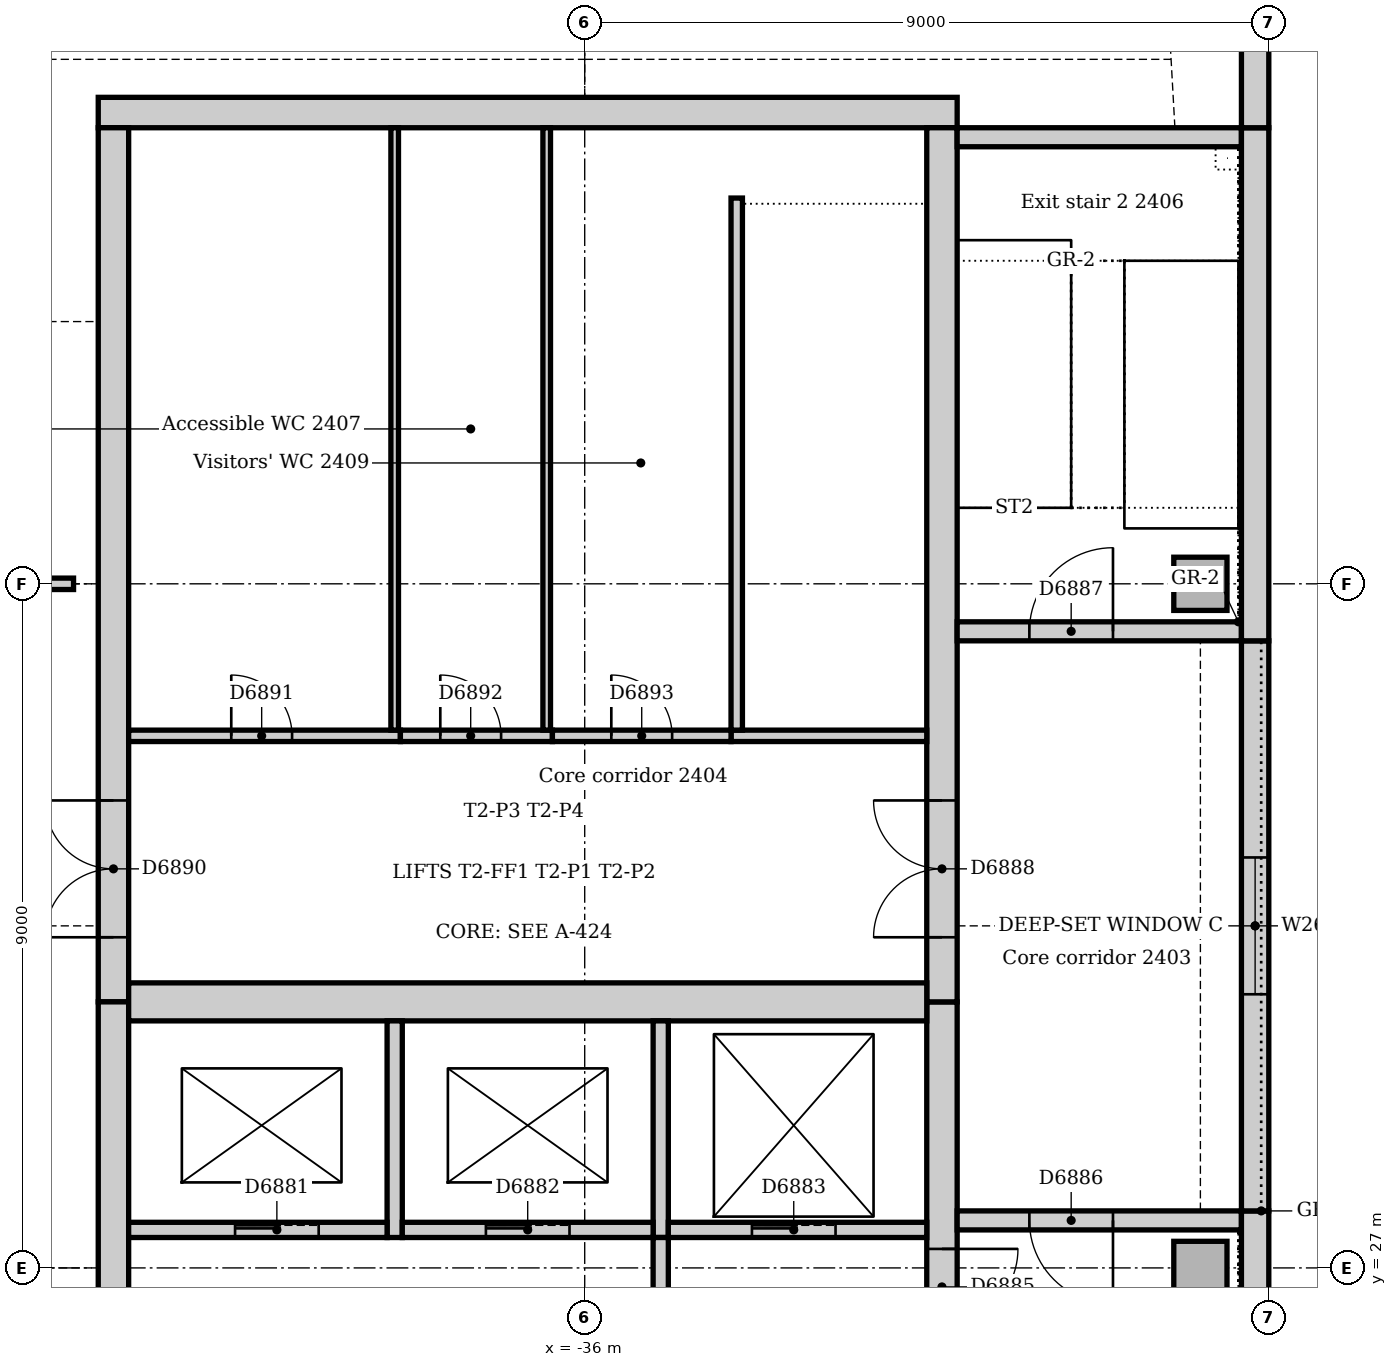
"""IFC4 building model, lengths in metres.
Left out: names, types, materials, properties, quantities, classifications, styles, units other than length and angle.
Written with IfcOpenShell. Run it as: python <this file> out.ifc"""

import sys

from ifc_helpers import new_model, si_unit, direction, frame, frame_2d, origin, origin_2d, place, context, subcontext, project, spatial, rectangle, extrude, element, fill, save


model = new_model("IFC4")
c1 = context("Model", 3, precision=1e-05, world=origin(), true_north=direction((0.0, 1.0)))
c2 = subcontext(c1, "Body", "Model", "MODEL_VIEW")
j1 = project(units=[si_unit("LENGTHUNIT", "METRE"), si_unit("PLANEANGLEUNIT", "RADIAN")], contexts=[c1])
p1 = place(None, origin())
s1 = spatial("IfcSite", under=j1, at=p1, CompositionType="ELEMENT")
p2 = place(p1, origin())
s2 = spatial("IfcBuilding", under=s1, at=p2, CompositionType="ELEMENT")
p3 = place(p2, frame((0.0, 0.0, 104.0)))
s3 = spatial("IfcBuildingStorey", under=s2, at=p3, CompositionType="ELEMENT", Elevation=104.0)
p4 = place(p3, frame((-31.1, 42.2, 0.0), z_axis=(0.0, 0.0, 1.0), x_axis=(-1.0, 0.0, 0.0)))
e1 = element("IfcWall", 1, at=p4, inside=s3, PredefinedType="SOLIDWALL", context=c2, shape_type="SweptSolid", body=[
    extrude(rectangle(XDim=11.3, YDim=0.4, at=frame_2d((5.65, 0.0))), origin(), (0.0, 0.0, 1.0), 4.0),
])
p5 = place(p3, frame((-31.3, 21.0, 0.0), z_axis=(0.0, 0.0, 1.0), x_axis=(0.0, 1.0, 0.0)))
e2 = element("IfcWall", 2, at=p5, inside=s3, PredefinedType="SOLIDWALL", context=c2, shape_type="SweptSolid", body=[
    extrude(rectangle(XDim=9.5, YDim=0.4, at=frame_2d((4.75, 0.0))), origin(), (0.0, 0.0, 1.0), 4.0),
])
p6 = place(p5, frame((5.25, 0.0, 0.0)))
e3 = element("IfcOpeningElement", 3, at=p6, cuts=e2, PredefinedType="OPENING", context=c2, shape_type="SweptSolid", body=[
    extrude(rectangle(XDim=1.0, YDim=2.1, at=frame_2d((0.5, 1.05))), frame((0.0, 0.21, 0.0), z_axis=(0.0, -1.0, 0.0), x_axis=(1.0, 0.0, 0.0)), (0.0, 0.0, 1.0), 0.42),
])
p7 = place(p3, frame((-31.3, 30.5, 0.0), z_axis=(0.0, 0.0, 1.0), x_axis=(0.0, 1.0, 0.0)))
e4 = element("IfcWall", 4, at=p7, inside=s3, PredefinedType="SOLIDWALL", context=c2, shape_type="SweptSolid", body=[
    extrude(rectangle(XDim=11.5, YDim=0.4, at=frame_2d((5.75, 0.0))), origin(), (0.0, 0.0, 1.0), 4.0),
])
p8 = place(p7, frame((0.85, 0.0, 0.0)))
e5 = element("IfcOpeningElement", 5, at=p8, cuts=e4, PredefinedType="OPENING", context=c2, shape_type="SweptSolid", body=[
    extrude(rectangle(XDim=1.8, YDim=2.1, at=frame_2d((0.9, 1.05))), frame((0.0, 0.21, 0.0), z_axis=(0.0, -1.0, 0.0), x_axis=(1.0, 0.0, 0.0)), (0.0, 0.0, 1.0), 0.42),
])
p9 = place(p3, frame((-42.2, 42.0, 0.0), z_axis=(0.0, 0.0, 1.0), x_axis=(0.0, -1.0, 0.0)))
e6 = element("IfcWall", 6, at=p9, inside=s3, PredefinedType="SOLIDWALL", context=c2, shape_type="SweptSolid", body=[
    extrude(rectangle(XDim=11.5, YDim=0.4, at=frame_2d((5.75, 0.0))), origin(), (0.0, 0.0, 1.0), 4.0),
])
p10 = place(p9, frame((8.85, 0.0, 0.0)))
e7 = element("IfcOpeningElement", 7, at=p10, cuts=e6, PredefinedType="OPENING", context=c2, shape_type="SweptSolid", body=[
    extrude(rectangle(XDim=1.8, YDim=2.1, at=frame_2d((0.9, 1.05))), frame((0.0, 0.21, 0.0), z_axis=(0.0, -1.0, 0.0), x_axis=(1.0, 0.0, 0.0)), (0.0, 0.0, 1.0), 0.42),
])
p11 = place(p3, frame((-42.2, 30.5, 0.0), z_axis=(0.0, 0.0, 1.0), x_axis=(0.0, -1.0, 0.0)))
e8 = element("IfcWall", 8, at=p11, inside=s3, PredefinedType="SOLIDWALL", context=c2, shape_type="SweptSolid", body=[
    extrude(rectangle(XDim=9.5, YDim=0.4, at=frame_2d((4.75, 0.0))), origin(), (0.0, 0.0, 1.0), 4.0),
])
p12 = place(p11, frame((3.85, 0.0, 0.0)))
e9 = element("IfcOpeningElement", 9, at=p12, cuts=e8, PredefinedType="OPENING", context=c2, shape_type="SweptSolid", body=[
    extrude(rectangle(XDim=1.8, YDim=2.1, at=frame_2d((0.9, 1.05))), frame((0.0, 0.21, 0.0), z_axis=(0.0, -1.0, 0.0), x_axis=(1.0, 0.0, 0.0)), (0.0, 0.0, 1.0), 0.42),
])
p13 = place(p3, frame((-42.0, 30.5, 0.0), z_axis=(0.0, 0.0, 1.0), x_axis=(1.0, 0.0, 0.0)))
e10 = element("IfcWall", 10, at=p13, inside=s3, PredefinedType="SOLIDWALL", context=c2, shape_type="SweptSolid", body=[
    extrude(rectangle(XDim=10.5, YDim=0.5, at=frame_2d((5.25, 0.0))), origin(), (0.0, 0.0, 1.0), 4.0),
])
p14 = place(p3, frame((-27.36, 27.625, 0.0), z_axis=(0.0, 0.0, 1.0), x_axis=(-1.0, 0.0, 0.0)))
e11 = element("IfcWall", 11, at=p14, inside=s3, PredefinedType="SOLIDWALL", context=c2, shape_type="SweptSolid", body=[
    extrude(rectangle(XDim=3.74, YDim=0.25, at=frame_2d((1.87, 0.0))), origin(), (0.0, 0.0, 1.0), 4.0),
])
p15 = place(p14, frame((1.69, 0.0, 0.0)))
e12 = element("IfcOpeningElement", 12, at=p15, cuts=e11, PredefinedType="OPENING", context=c2, shape_type="SweptSolid", body=[
    extrude(rectangle(XDim=1.1, YDim=2.1, at=frame_2d((0.55, 1.05))), frame((0.0, 0.135, 0.0), z_axis=(0.0, -1.0, 0.0), x_axis=(1.0, 0.0, 0.0)), (0.0, 0.0, 1.0), 0.27),
])
p16 = place(p3, frame((-31.1, 35.375, 0.0), z_axis=(0.0, 0.0, 1.0), x_axis=(1.0, 0.0, 0.0)))
e13 = element("IfcWall", 13, at=p16, inside=s3, PredefinedType="SOLIDWALL", context=c2, shape_type="SweptSolid", body=[
    extrude(rectangle(XDim=3.74, YDim=0.25, at=frame_2d((1.87, 0.0))), origin(), (0.0, 0.0, 1.0), 4.0),
])
p17 = place(p16, frame((0.95, 0.0, 0.0)))
e14 = element("IfcOpeningElement", 14, at=p17, cuts=e13, PredefinedType="OPENING", context=c2, shape_type="SweptSolid", body=[
    extrude(rectangle(XDim=1.1, YDim=2.1, at=frame_2d((0.55, 1.05))), frame((0.0, 0.135, 0.0), z_axis=(0.0, -1.0, 0.0), x_axis=(1.0, 0.0, 0.0)), (0.0, 0.0, 1.0), 0.27),
])
p18 = place(p3, frame((-27.36, 41.875, 0.0), z_axis=(0.0, 0.0, 1.0), x_axis=(-1.0, 0.0, 0.0)))
e15 = element("IfcWall", 15, at=p18, inside=s3, PredefinedType="SOLIDWALL", context=c2, shape_type="SweptSolid", body=[
    extrude(rectangle(XDim=3.74, YDim=0.25, at=frame_2d((1.87, 0.0))), origin(), (0.0, 0.0, 1.0), 4.0),
])
for number, where, z_axis, x_axis in (
    (16, (-27.9, 27.0, 0.0), (0.0, 0.0, 1.0), (1.0, 0.0, 0.0)),
    (17, (-27.9, 36.0, 0.0), (0.0, 0.0, 1.0), (1.0, 0.0, 0.0)),
):
    element("IfcColumn", number, at=place(p3, frame(where, z_axis=z_axis, x_axis=x_axis)), inside=s3, PredefinedType="COLUMN", context=c2, shape_type="SweptSolid", body=[
        extrude(rectangle(XDim=0.7, YDim=0.7, at=origin_2d()), origin(), (0.0, 0.0, 1.0), 4.0),
    ])
p19 = place(p3, frame((-27.18, 21.0, 0.0), z_axis=(0.0, 0.0, 1.0), x_axis=(0.0, 1.0, 0.0)))
e18 = element("IfcWall", 18, at=p19, inside=s3, PredefinedType="STANDARD", context=c2, shape_type="SweptSolid", body=[
    extrude(rectangle(XDim=6.75, YDim=0.36, at=frame_2d((3.375, 0.0))), origin(), (0.0, 0.0, 1.0), 3.85),
])
p20 = place(p3, frame((-27.18, 27.75, 0.0), z_axis=(0.0, 0.0, 1.0), x_axis=(0.0, 1.0, 0.0)))
e19 = element("IfcWall", 19, at=p20, inside=s3, PredefinedType="STANDARD", context=c2, shape_type="SweptSolid", body=[
    extrude(rectangle(XDim=7.5, YDim=0.36, at=frame_2d((3.75, 0.0))), origin(), (0.0, 0.0, 1.0), 3.85),
])
p21 = place(p20, frame((2.85, 0.0, 1.2)))
e20 = element("IfcOpeningElement", 20, at=p21, cuts=e19, PredefinedType="OPENING", context=c2, shape_type="SweptSolid", body=[
    extrude(rectangle(XDim=1.8, YDim=1.2, at=frame_2d((0.9, 0.6))), frame((0.0, 0.19, 0.0), z_axis=(0.0, -1.0, 0.0), x_axis=(1.0, 0.0, 0.0)), (0.0, 0.0, 1.0), 0.38),
])
p22 = place(p3, frame((-27.18, 35.25, 0.0), z_axis=(0.0, 0.0, 1.0), x_axis=(0.0, 1.0, 0.0)))
e21 = element("IfcWall", 21, at=p22, inside=s3, PredefinedType="STANDARD", context=c2, shape_type="SweptSolid", body=[
    extrude(rectangle(XDim=6.75, YDim=0.36, at=frame_2d((3.375, 0.0))), origin(), (0.0, 0.0, 1.0), 3.85),
])
p23 = place(p3, frame((-27.18, 42.0, 0.0), z_axis=(0.0, 0.0, 1.0), x_axis=(0.0, 1.0, 0.0)))
e22 = element("IfcWall", 22, at=p23, inside=s3, PredefinedType="STANDARD", context=c2, shape_type="SweptSolid", body=[
    extrude(rectangle(XDim=3.257, YDim=0.36, at=frame_2d((1.629, 0.0))), origin(), (0.0, 0.0, 1.0), 3.85),
])
p24 = place(p3, frame((-38.5, 27.4, 0.0), z_axis=(0.0, 0.0, 1.0), x_axis=(0.0, 1.0, 0.0)))
e23 = element("IfcWall", 23, at=p24, inside=s3, PredefinedType="SOLIDWALL", context=c2, shape_type="SweptSolid", body=[
    extrude(rectangle(XDim=2.85, YDim=0.2, at=frame_2d((1.425, 0.0))), origin(), (0.0, 0.0, 1.0), 4.0),
])
p25 = place(p3, frame((-42.0, 27.5, 0.0), z_axis=(0.0, 0.0, 1.0), x_axis=(1.0, 0.0, 0.0)))
e24 = element("IfcWall", 24, at=p25, inside=s3, PredefinedType="SOLIDWALL", context=c2, shape_type="SweptSolid", body=[
    extrude(rectangle(XDim=3.4, YDim=0.2, at=frame_2d((1.7, 0.0))), origin(), (0.0, 0.0, 1.0), 4.0),
])
p26 = place(p25, frame((1.4, 0.0, 0.0)))
e25 = element("IfcOpeningElement", 25, at=p26, cuts=e24, PredefinedType="OPENING", context=c2, shape_type="SweptSolid", body=[
    extrude(rectangle(XDim=1.1, YDim=2.1, at=frame_2d((0.55, 1.05))), frame((0.0, 0.11, 0.0), z_axis=(0.0, -1.0, 0.0), x_axis=(1.0, 0.0, 0.0)), (0.0, 0.0, 1.0), 0.22),
])
p27 = place(p3, frame((-35.0, 27.4, 0.0), z_axis=(0.0, 0.0, 1.0), x_axis=(0.0, 1.0, 0.0)))
e26 = element("IfcWall", 26, at=p27, inside=s3, PredefinedType="SOLIDWALL", context=c2, shape_type="SweptSolid", body=[
    extrude(rectangle(XDim=2.85, YDim=0.2, at=frame_2d((1.425, 0.0))), origin(), (0.0, 0.0, 1.0), 4.0),
])
p28 = place(p3, frame((-38.4, 27.5, 0.0), z_axis=(0.0, 0.0, 1.0), x_axis=(1.0, 0.0, 0.0)))
e27 = element("IfcWall", 27, at=p28, inside=s3, PredefinedType="SOLIDWALL", context=c2, shape_type="SweptSolid", body=[
    extrude(rectangle(XDim=3.3, YDim=0.2, at=frame_2d((1.65, 0.0))), origin(), (0.0, 0.0, 1.0), 4.0),
])
p29 = place(p28, frame((1.1, 0.0, 0.0)))
e28 = element("IfcOpeningElement", 28, at=p29, cuts=e27, PredefinedType="OPENING", context=c2, shape_type="SweptSolid", body=[
    extrude(rectangle(XDim=1.1, YDim=2.1, at=frame_2d((0.55, 1.05))), frame((0.0, 0.11, 0.0), z_axis=(0.0, -1.0, 0.0), x_axis=(1.0, 0.0, 0.0)), (0.0, 0.0, 1.0), 0.22),
])
p30 = place(p3, frame((-34.9, 27.5, 0.0), z_axis=(0.0, 0.0, 1.0), x_axis=(1.0, 0.0, 0.0)))
e29 = element("IfcWall", 29, at=p30, inside=s3, PredefinedType="SOLIDWALL", context=c2, shape_type="SweptSolid", body=[
    extrude(rectangle(XDim=3.4, YDim=0.2, at=frame_2d((1.7, 0.0))), origin(), (0.0, 0.0, 1.0), 4.0),
])
p31 = place(p30, frame((1.1, 0.0, 0.0)))
e30 = element("IfcOpeningElement", 30, at=p31, cuts=e29, PredefinedType="OPENING", context=c2, shape_type="SweptSolid", body=[
    extrude(rectangle(XDim=1.1, YDim=2.1, at=frame_2d((0.55, 1.05))), frame((0.0, 0.11, 0.0), z_axis=(0.0, -1.0, 0.0), x_axis=(1.0, 0.0, 0.0)), (0.0, 0.0, 1.0), 0.22),
])
p32 = place(p3, frame((-35.0, 24.1, 0.0), z_axis=(0.0, 0.0, 1.0), x_axis=(0.0, 1.0, 0.0)))
e31 = element("IfcWall", 31, at=p32, inside=s3, PredefinedType="SOLIDWALL", context=c2, shape_type="SweptSolid", body=[
    extrude(rectangle(XDim=3.3, YDim=0.2, at=frame_2d((1.65, 0.0))), origin(), (0.0, 0.0, 1.0), 4.0),
])
p33 = place(p32, frame((1.15, 0.0, 0.0)))
e32 = element("IfcOpeningElement", 32, at=p33, cuts=e31, PredefinedType="OPENING", context=c2, shape_type="SweptSolid", body=[
    extrude(rectangle(XDim=1.0, YDim=2.1, at=frame_2d((0.5, 1.05))), frame((0.0, 0.11, 0.0), z_axis=(0.0, -1.0, 0.0), x_axis=(1.0, 0.0, 0.0)), (0.0, 0.0, 1.0), 0.22),
])
p34 = place(p3, frame((-34.075, 34.0, 0.0), z_axis=(0.0, 0.0, 1.0), x_axis=(1.0, 0.0, 0.0)))
e33 = element("IfcWall", 33, at=p34, inside=s3, PredefinedType="SOLIDWALL", context=c2, shape_type="SweptSolid", body=[
    extrude(rectangle(XDim=2.575, YDim=0.15, at=frame_2d((1.288, 0.0))), origin(), (0.0, 0.0, 1.0), 4.0),
])
p35 = place(p3, frame((-34.0, 41.075, 0.0), z_axis=(0.0, 0.0, 1.0), x_axis=(0.0, -1.0, 0.0)))
e34 = element("IfcWall", 34, at=p35, inside=s3, PredefinedType="SOLIDWALL", context=c2, shape_type="SweptSolid", body=[
    extrude(rectangle(XDim=7.0, YDim=0.15, at=frame_2d((3.5, 0.0))), origin(), (0.0, 0.0, 1.0), 4.0),
])
p36 = place(p3, frame((-38.425, 34.0, 0.0), z_axis=(0.0, 0.0, 1.0), x_axis=(-1.0, 0.0, 0.0)))
e35 = element("IfcWall", 35, at=p36, inside=s3, PredefinedType="PARTITIONING", context=c2, shape_type="SweptSolid", body=[
    extrude(rectangle(XDim=3.575, YDim=0.15, at=frame_2d((1.788, 0.0))), origin(), (0.0, 0.0, 1.0), 3.85),
])
p37 = place(p36, frame((1.425, 0.0, 0.0)))
e36 = element("IfcOpeningElement", 36, at=p37, cuts=e35, PredefinedType="OPENING", context=c2, shape_type="SweptSolid", body=[
    extrude(rectangle(XDim=0.8, YDim=2.1, at=frame_2d((0.4, 1.05))), frame((0.0, 0.085, 0.0), z_axis=(0.0, -1.0, 0.0), x_axis=(1.0, 0.0, 0.0)), (0.0, 0.0, 1.0), 0.17),
])
p38 = place(p3, frame((-36.425, 34.0, 0.0), z_axis=(0.0, 0.0, 1.0), x_axis=(-1.0, 0.0, 0.0)))
e37 = element("IfcWall", 37, at=p38, inside=s3, PredefinedType="PARTITIONING", context=c2, shape_type="SweptSolid", body=[
    extrude(rectangle(XDim=2.0, YDim=0.15, at=frame_2d((1.0, 0.0))), origin(), (0.0, 0.0, 1.0), 3.85),
])
p39 = place(p38, frame((0.675, 0.0, 0.0)))
e38 = element("IfcOpeningElement", 38, at=p39, cuts=e37, PredefinedType="OPENING", context=c2, shape_type="SweptSolid", body=[
    extrude(rectangle(XDim=0.8, YDim=2.1, at=frame_2d((0.4, 1.05))), frame((0.0, 0.085, 0.0), z_axis=(0.0, -1.0, 0.0), x_axis=(1.0, 0.0, 0.0)), (0.0, 0.0, 1.0), 0.17),
])
p40 = place(p3, frame((-34.075, 34.0, 0.0), z_axis=(0.0, 0.0, 1.0), x_axis=(-1.0, 0.0, 0.0)))
e39 = element("IfcWall", 39, at=p40, inside=s3, PredefinedType="PARTITIONING", context=c2, shape_type="SweptSolid", body=[
    extrude(rectangle(XDim=2.35, YDim=0.15, at=frame_2d((1.175, 0.0))), origin(), (0.0, 0.0, 1.0), 3.85),
])
p41 = place(p40, frame((0.775, 0.0, 0.0)))
e40 = element("IfcOpeningElement", 40, at=p41, cuts=e39, PredefinedType="OPENING", context=c2, shape_type="SweptSolid", body=[
    extrude(rectangle(XDim=0.8, YDim=2.1, at=frame_2d((0.4, 1.05))), frame((0.0, 0.085, 0.0), z_axis=(0.0, -1.0, 0.0), x_axis=(1.0, 0.0, 0.0)), (0.0, 0.0, 1.0), 0.17),
])
for number, where, z_axis, x_axis in (
    (41, (-38.5, 34.075, 0.0), (0.0, 0.0, 1.0), (0.0, 1.0, 0.0)),
    (42, (-36.5, 34.075, 0.0), (0.0, 0.0, 1.0), (0.0, 1.0, 0.0)),
):
    element("IfcWall", number, at=place(p3, frame(where, z_axis=z_axis, x_axis=x_axis)), inside=s3, PredefinedType="PARTITIONING", context=c2, shape_type="SweptSolid", body=[
        extrude(rectangle(XDim=7.925, YDim=0.1, at=frame_2d((3.962, 0.0))), origin(), (0.0, 0.0, 1.0), 3.85),
    ])
p42 = place(p3, frame((-44.7, 36.0, 0.0), z_axis=(0.0, 0.0, 1.0), x_axis=(1.0, 0.0, 0.0)))
e43 = element("IfcWall", 43, at=p42, inside=s3, PredefinedType="PARTITIONING", context=c2, shape_type="SweptSolid", body=[
    extrude(rectangle(XDim=1.975, YDim=0.15, at=frame_2d((0.988, 0.0))), origin(), (0.0, 0.0, 1.0), 3.602),
])
p43 = place(p42, frame((0.55, 0.0, 0.0)))
e44 = element("IfcOpeningElement", 44, at=p43, cuts=e43, PredefinedType="OPENING", context=c2, shape_type="SweptSolid", body=[
    extrude(rectangle(XDim=0.9, YDim=2.1, at=frame_2d((0.45, 1.05))), frame((0.0, 0.085, 0.0), z_axis=(0.0, -1.0, 0.0), x_axis=(1.0, 0.0, 0.0)), (0.0, 0.0, 1.0), 0.17),
])
p44 = place(p21, origin())
e45 = element("IfcWindow", 45, at=p44, inside=s3, PartitioningType="SINGLE_PANEL", PredefinedType="WINDOW", context=c2, shape_type="SweptSolid", body=[
    extrude(rectangle(XDim=1.8, YDim=1.2, at=frame_2d((0.9, 0.6))), frame((0.0, 0.13, 0.0), z_axis=(0.0, -1.0, 0.0), x_axis=(1.0, 0.0, 0.0)), (0.0, 0.0, 1.0), 0.06),
])
fill(e20, e45)
p45 = place(p26, origin())
e46 = element("IfcDoor", 46, at=p45, inside=s3, OperationType="SLIDING_TO_LEFT", PredefinedType="DOOR", context=c2, shape_type="SweptSolid", body=[
    extrude(rectangle(XDim=1.1, YDim=2.1, at=frame_2d((0.55, 1.05))), frame((0.0, 0.025, 0.0), z_axis=(0.0, -1.0, 0.0), x_axis=(1.0, 0.0, 0.0)), (0.0, 0.0, 1.0), 0.05),
])
fill(e25, e46)
p46 = place(p29, origin())
e47 = element("IfcDoor", 47, at=p46, inside=s3, OperationType="SLIDING_TO_LEFT", PredefinedType="DOOR", context=c2, shape_type="SweptSolid", body=[
    extrude(rectangle(XDim=1.1, YDim=2.1, at=frame_2d((0.55, 1.05))), frame((0.0, 0.025, 0.0), z_axis=(0.0, -1.0, 0.0), x_axis=(1.0, 0.0, 0.0)), (0.0, 0.0, 1.0), 0.05),
])
fill(e28, e47)
p47 = place(p31, origin())
e48 = element("IfcDoor", 48, at=p47, inside=s3, OperationType="SLIDING_TO_LEFT", PredefinedType="DOOR", context=c2, shape_type="SweptSolid", body=[
    extrude(rectangle(XDim=1.1, YDim=2.1, at=frame_2d((0.55, 1.05))), frame((0.0, 0.025, 0.0), z_axis=(0.0, -1.0, 0.0), x_axis=(1.0, 0.0, 0.0)), (0.0, 0.0, 1.0), 0.05),
])
fill(e30, e48)
p48 = place(p6, frame((1.0, 0.0, 0.0), z_axis=(0.0, 0.0, 1.0), x_axis=(-1.0, 0.0, 0.0)))
e49 = element("IfcDoor", 49, at=p48, inside=s3, OperationType="SINGLE_SWING_LEFT", PredefinedType="DOOR", context=c2, shape_type="SweptSolid", body=[
    extrude(rectangle(XDim=1.0, YDim=2.1, at=frame_2d((0.5, 1.05))), frame((0.0, 0.025, 0.0), z_axis=(0.0, -1.0, 0.0), x_axis=(1.0, 0.0, 0.0)), (0.0, 0.0, 1.0), 0.05),
])
fill(e3, e49)
p49 = place(p15, origin())
e50 = element("IfcDoor", 50, at=p49, inside=s3, OperationType="SINGLE_SWING_LEFT", PredefinedType="DOOR", context=c2, shape_type="SweptSolid", body=[
    extrude(rectangle(XDim=1.1, YDim=2.1, at=frame_2d((0.55, 1.05))), frame((0.0, 0.025, 0.0), z_axis=(0.0, -1.0, 0.0), x_axis=(1.0, 0.0, 0.0)), (0.0, 0.0, 1.0), 0.05),
])
fill(e12, e50)
p50 = place(p17, origin())
e51 = element("IfcDoor", 51, at=p50, inside=s3, OperationType="SINGLE_SWING_RIGHT", PredefinedType="DOOR", context=c2, shape_type="SweptSolid", body=[
    extrude(rectangle(XDim=1.1, YDim=2.1, at=frame_2d((0.55, 1.05))), frame((0.0, 0.025, 0.0), z_axis=(0.0, -1.0, 0.0), x_axis=(1.0, 0.0, 0.0)), (0.0, 0.0, 1.0), 0.05),
])
fill(e14, e51)
p51 = place(p8, origin())
e52 = element("IfcDoor", 52, at=p51, inside=s3, OperationType="DOUBLE_DOOR_SINGLE_SWING", PredefinedType="DOOR", context=c2, shape_type="SweptSolid", body=[
    extrude(rectangle(XDim=1.8, YDim=2.1, at=frame_2d((0.9, 1.05))), frame((0.0, 0.025, 0.0), z_axis=(0.0, -1.0, 0.0), x_axis=(1.0, 0.0, 0.0)), (0.0, 0.0, 1.0), 0.05),
])
fill(e5, e52)
p52 = place(p10, frame((1.8, 0.0, 0.0), z_axis=(0.0, 0.0, 1.0), x_axis=(-1.0, 0.0, 0.0)))
e53 = element("IfcDoor", 53, at=p52, inside=s3, OperationType="DOUBLE_DOOR_SINGLE_SWING", PredefinedType="DOOR", context=c2, shape_type="SweptSolid", body=[
    extrude(rectangle(XDim=1.8, YDim=2.1, at=frame_2d((0.9, 1.05))), frame((0.0, 0.025, 0.0), z_axis=(0.0, -1.0, 0.0), x_axis=(1.0, 0.0, 0.0)), (0.0, 0.0, 1.0), 0.05),
])
fill(e7, e53)
p53 = place(p37, frame((0.8, 0.0, 0.0), z_axis=(0.0, 0.0, 1.0), x_axis=(-1.0, 0.0, 0.0)))
e54 = element("IfcDoor", 54, at=p53, inside=s3, OperationType="SINGLE_SWING_LEFT", PredefinedType="DOOR", context=c2, shape_type="SweptSolid", body=[
    extrude(rectangle(XDim=0.8, YDim=2.1, at=frame_2d((0.4, 1.05))), frame((0.0, 0.025, 0.0), z_axis=(0.0, -1.0, 0.0), x_axis=(1.0, 0.0, 0.0)), (0.0, 0.0, 1.0), 0.05),
])
fill(e36, e54)
p54 = place(p39, frame((0.8, 0.0, 0.0), z_axis=(0.0, 0.0, 1.0), x_axis=(-1.0, 0.0, 0.0)))
e55 = element("IfcDoor", 55, at=p54, inside=s3, OperationType="SINGLE_SWING_LEFT", PredefinedType="DOOR", context=c2, shape_type="SweptSolid", body=[
    extrude(rectangle(XDim=0.8, YDim=2.1, at=frame_2d((0.4, 1.05))), frame((0.0, 0.025, 0.0), z_axis=(0.0, -1.0, 0.0), x_axis=(1.0, 0.0, 0.0)), (0.0, 0.0, 1.0), 0.05),
])
fill(e38, e55)
p55 = place(p41, frame((0.8, 0.0, 0.0), z_axis=(0.0, 0.0, 1.0), x_axis=(-1.0, 0.0, 0.0)))
e56 = element("IfcDoor", 56, at=p55, inside=s3, OperationType="SINGLE_SWING_LEFT", PredefinedType="DOOR", context=c2, shape_type="SweptSolid", body=[
    extrude(rectangle(XDim=0.8, YDim=2.1, at=frame_2d((0.4, 1.05))), frame((0.0, 0.025, 0.0), z_axis=(0.0, -1.0, 0.0), x_axis=(1.0, 0.0, 0.0)), (0.0, 0.0, 1.0), 0.05),
])
fill(e40, e56)
save(model, sys.argv[1])
